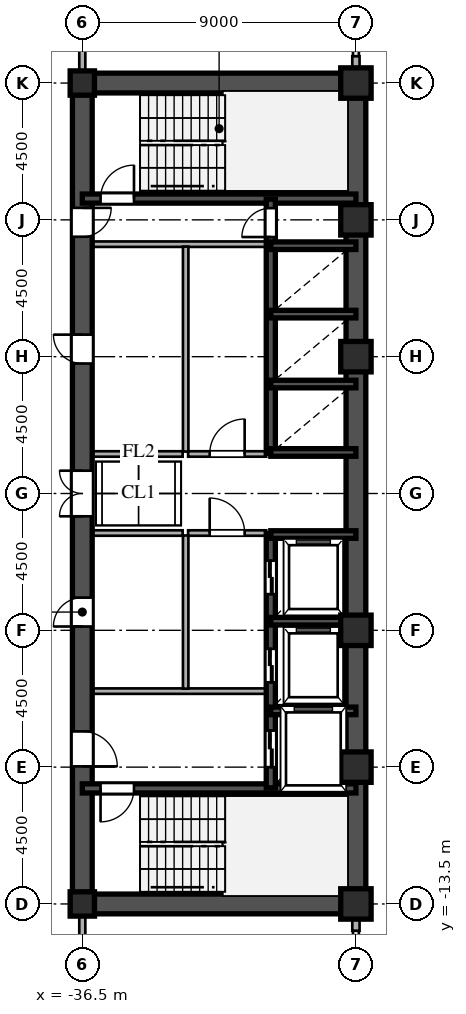
"""IFC4 building model, lengths in metres.
Left out: names, types, materials, properties, quantities, classifications, styles, units other than length and angle.
Written with IfcOpenShell. Run it as: python <this file> out.ifc"""

import sys

from ifc_helpers import new_model, si_unit, direction, frame, frame_2d, origin, origin_2d, place, context, subcontext, project, spatial, rectangle, hollow_rectangle, i_section, extrude, source, transform, mapped, element, fill, save


model = new_model("IFC4")
c1 = context("Model", 3, precision=1e-05, world=origin(), true_north=direction((0.0, 1.0)))
c2 = subcontext(c1, "Body", "Model", "MODEL_VIEW")
j1 = project(units=[si_unit("LENGTHUNIT", "METRE"), si_unit("PLANEANGLEUNIT", "RADIAN")], contexts=[c1])
p1 = place(None, origin())
s1 = spatial("IfcSite", under=j1, at=p1, CompositionType="ELEMENT")
p2 = place(p1, origin())
s2 = spatial("IfcBuilding", under=s1, at=p2, CompositionType="ELEMENT")
p3 = place(p2, frame((0.0, 0.0, 83.7)))
s3 = spatial("IfcBuildingStorey", under=s2, at=p3, CompositionType="ELEMENT", Elevation=83.7)
m1 = source(origin(), c2, "Body", "SweptSolid", [
    extrude(hollow_rectangle(XDim=1.0, YDim=1.0, WallThickness=0.042, at=origin_2d()), origin(), (0.0, 0.0, 1.0), 3.6),
])
for number, where, z_axis, x_axis in (
    (1, (-27.5, -13.5, 0.0), (0.0, 0.0, 1.0), (1.0, 0.0, 0.0)),
    (2, (-27.5, -9.0, 0.0), (0.0, 0.0, 1.0), (1.0, 0.0, 0.0)),
    (3, (-27.5, -4.5, 0.0), (0.0, 0.0, 1.0), (1.0, 0.0, 0.0)),
    (4, (-27.5, 4.5, 0.0), (0.0, 0.0, 1.0), (1.0, 0.0, 0.0)),
    (5, (-27.5, 9.0, 0.0), (0.0, 0.0, 1.0), (1.0, 0.0, 0.0)),
    (6, (-27.5, 13.5, 0.0), (0.0, 0.0, 1.0), (1.0, 0.0, 0.0)),
):
    element("IfcColumn", number, at=place(p3, frame(where, z_axis=z_axis, x_axis=x_axis)), inside=s3, PredefinedType="COLUMN", context=c2, shape_type="MappedRepresentation", body=[
        mapped(m1, transform((0.0, 0.0, 0.0), scale=1.0)),
    ])
m2 = source(origin(), c2, "Body", "SweptSolid", [
    extrude(i_section(OverallWidth=0.8, OverallDepth=0.8, WebThickness=0.032, FlangeThickness=0.05, at=origin_2d()), origin(), (0.0, 0.0, 1.0), 3.6),
])
for number, where, z_axis, x_axis in (
    (7, (-36.5, -13.5, 0.0), (0.0, 0.0, 1.0), (1.0, 0.0, 0.0)),
    (8, (-36.5, 13.5, 0.0), (0.0, 0.0, 1.0), (1.0, 0.0, 0.0)),
):
    element("IfcColumn", number, at=place(p3, frame(where, z_axis=z_axis, x_axis=x_axis)), inside=s3, PredefinedType="COLUMN", context=c2, shape_type="MappedRepresentation", body=[
        mapped(m2, transform((0.0, 0.0, 0.0), scale=1.0)),
    ])
for number, where, z_axis, x_axis in (
    (9, (-27.5, -14.38, 0.0), (0.0, 0.0, 1.0), (0.0, 1.0, 0.0)),
    (10, (-27.5, 13.83, 0.0), (0.0, 0.0, 1.0), (0.0, 1.0, 0.0)),
):
    element("IfcWall", number, at=place(p3, frame(where, z_axis=z_axis, x_axis=x_axis)), inside=s3, PredefinedType="SOLIDWALL", context=c2, shape_type="SweptSolid", body=[
        extrude(rectangle(XDim=0.55, YDim=0.24, at=frame_2d((0.275, 0.0))), origin(), (0.0, 0.0, 1.0), 2.84),
    ])
for number, where, z_axis, x_axis in (
    (11, (-27.5, -13.5, 0.0), (0.0, 0.0, 1.0), (0.0, 1.0, 0.0)),
    (12, (-27.5, 1.3, 0.0), (0.0, 0.0, 1.0), (0.0, 1.0, 0.0)),
):
    element("IfcWall", number, at=place(p3, frame(where, z_axis=z_axis, x_axis=x_axis)), inside=s3, PredefinedType="SHEAR", context=c2, shape_type="SweptSolid", body=[
        extrude(rectangle(XDim=12.2, YDim=0.65, at=frame_2d((6.1, 0.0))), origin(), (0.0, 0.0, 1.0), 3.34),
    ])
p4 = place(p3, frame((-27.5, -1.3, 0.0), z_axis=(0.0, 0.0, 1.0), x_axis=(0.0, 1.0, 0.0)))
e13 = element("IfcWall", 13, at=p4, inside=s3, PredefinedType="SHEAR", context=c2, shape_type="SweptSolid", body=[
    extrude(rectangle(XDim=2.6, YDim=0.65, at=frame_2d((1.3, 0.0))), origin(), (0.0, 0.0, 1.0), 3.34),
])
for number, where, z_axis, x_axis in (
    (14, (-36.5, -13.5, 0.0), (0.0, 0.0, 1.0), (1.0, 0.0, 0.0)),
    (15, (-36.5, 13.5, 0.0), (0.0, 0.0, 1.0), (1.0, 0.0, 0.0)),
):
    element("IfcWall", number, at=place(p3, frame(where, z_axis=z_axis, x_axis=x_axis)), inside=s3, PredefinedType="SHEAR", context=c2, shape_type="SweptSolid", body=[
        extrude(rectangle(XDim=9.0, YDim=0.65, at=frame_2d((4.5, 0.0))), origin(), (0.0, 0.0, 1.0), 3.34),
    ])
p5 = place(p3, frame((-36.5, -13.65, 0.0), z_axis=(0.0, 0.0, 1.0), x_axis=(0.0, 1.0, 0.0)))
e16 = element("IfcWall", 16, at=p5, inside=s3, PredefinedType="SHEAR", context=c2, shape_type="SweptSolid", body=[
    extrude(rectangle(XDim=7.15, YDim=0.65, at=frame_2d((3.575, 0.0))), origin(), (0.0, 0.0, 1.0), 3.34),
])
p6 = place(p5, frame((4.675, 0.0, 0.0)))
e17 = element("IfcOpeningElement", 17, at=p6, cuts=e16, PredefinedType="OPENING", context=c2, shape_type="SweptSolid", body=[
    extrude(rectangle(XDim=1.15, YDim=2.2, at=frame_2d((0.575, 1.1))), frame((0.0, 0.335, 0.0), z_axis=(0.0, -1.0, 0.0), x_axis=(1.0, 0.0, 0.0)), (0.0, 0.0, 1.0), 0.67),
])
p7 = place(p3, frame((-36.5, -1.3, 0.0), z_axis=(0.0, 0.0, 1.0), x_axis=(0.0, 1.0, 0.0)))
e18 = element("IfcWall", 18, at=p7, inside=s3, PredefinedType="SHEAR", context=c2, shape_type="SweptSolid", body=[
    extrude(rectangle(XDim=2.6, YDim=0.65, at=frame_2d((1.3, 0.0))), origin(), (0.0, 0.0, 1.0), 3.34),
])
p8 = place(p7, frame((0.55, 0.0, 0.0)))
e19 = element("IfcOpeningElement", 19, at=p8, cuts=e18, PredefinedType="OPENING", context=c2, shape_type="SweptSolid", body=[
    extrude(rectangle(XDim=1.5, YDim=2.3, at=frame_2d((0.75, 1.15))), frame((0.0, 0.335, 0.0), z_axis=(0.0, -1.0, 0.0), x_axis=(1.0, 0.0, 0.0)), (0.0, 0.0, 1.0), 0.67),
])
p9 = place(p3, frame((-36.5, 8.2, 0.0), z_axis=(0.0, 0.0, 1.0), x_axis=(0.0, 1.0, 0.0)))
e20 = element("IfcWall", 20, at=p9, inside=s3, PredefinedType="SHEAR", context=c2, shape_type="SweptSolid", body=[
    extrude(rectangle(XDim=5.45, YDim=0.65, at=frame_2d((2.725, 0.0))), origin(), (0.0, 0.0, 1.0), 3.34),
])
p10 = place(p9, frame((0.245, 0.0, 0.0)))
e21 = element("IfcOpeningElement", 21, at=p10, cuts=e20, PredefinedType="OPENING", context=c2, shape_type="SweptSolid", body=[
    extrude(rectangle(XDim=0.95, YDim=2.15, at=frame_2d((0.475, 1.075))), frame((0.0, 0.335, 0.0), z_axis=(0.0, -1.0, 0.0), x_axis=(1.0, 0.0, 0.0)), (0.0, 0.0, 1.0), 0.67),
])
p11 = place(p3, frame((-36.5, -6.5, 0.0), z_axis=(0.0, 0.0, 1.0), x_axis=(0.0, 1.0, 0.0)))
e22 = element("IfcWall", 22, at=p11, inside=s3, PredefinedType="SHEAR", context=c2, shape_type="SweptSolid", body=[
    extrude(rectangle(XDim=5.2, YDim=0.65, at=frame_2d((2.6, 0.0))), origin(), (0.0, 0.0, 1.0), 3.34),
])
p12 = place(p11, frame((2.125, 0.0, 0.0)))
e23 = element("IfcOpeningElement", 23, at=p12, cuts=e22, PredefinedType="OPENING", context=c2, shape_type="SweptSolid", body=[
    extrude(rectangle(XDim=0.95, YDim=2.15, at=frame_2d((0.475, 1.075))), frame((0.0, 0.335, 0.0), z_axis=(0.0, -1.0, 0.0), x_axis=(1.0, 0.0, 0.0)), (0.0, 0.0, 1.0), 0.67),
])
p13 = place(p3, frame((-36.5, 1.3, 0.0), z_axis=(0.0, 0.0, 1.0), x_axis=(0.0, 1.0, 0.0)))
e24 = element("IfcWall", 24, at=p13, inside=s3, PredefinedType="SHEAR", context=c2, shape_type="SweptSolid", body=[
    extrude(rectangle(XDim=6.9, YDim=0.65, at=frame_2d((3.45, 0.0))), origin(), (0.0, 0.0, 1.0), 3.34),
])
p14 = place(p13, frame((2.975, 0.0, 0.0)))
e25 = element("IfcOpeningElement", 25, at=p14, cuts=e24, PredefinedType="OPENING", context=c2, shape_type="SweptSolid", body=[
    extrude(rectangle(XDim=0.95, YDim=2.15, at=frame_2d((0.475, 1.075))), frame((0.0, 0.335, 0.0), z_axis=(0.0, -1.0, 0.0), x_axis=(1.0, 0.0, 0.0)), (0.0, 0.0, 1.0), 0.67),
])
p15 = place(p3, frame((-36.5, -9.7, 0.0), z_axis=(0.0, 0.0, 1.0), x_axis=(1.0, 0.0, 0.0)))
e26 = element("IfcWall", 26, at=p15, inside=s3, PredefinedType="SHEAR", context=c2, shape_type="SweptSolid", body=[
    extrude(rectangle(XDim=9.0, YDim=0.3, at=frame_2d((4.5, 0.0))), origin(), (0.0, 0.0, 1.0), 3.34),
])
p16 = place(p15, frame((0.6, 0.0, 0.0)))
e27 = element("IfcOpeningElement", 27, at=p16, cuts=e26, PredefinedType="OPENING", context=c2, shape_type="SweptSolid", body=[
    extrude(rectangle(XDim=1.1, YDim=2.2, at=frame_2d((0.55, 1.1))), frame((0.0, 0.16, 0.0), z_axis=(0.0, -1.0, 0.0), x_axis=(1.0, 0.0, 0.0)), (0.0, 0.0, 1.0), 0.32),
])
p17 = place(p3, frame((-36.5, 9.7, 0.0), z_axis=(0.0, 0.0, 1.0), x_axis=(1.0, 0.0, 0.0)))
e28 = element("IfcWall", 28, at=p17, inside=s3, PredefinedType="SHEAR", context=c2, shape_type="SweptSolid", body=[
    extrude(rectangle(XDim=9.0, YDim=0.3, at=frame_2d((4.5, 0.0))), origin(), (0.0, 0.0, 1.0), 3.34),
])
p18 = place(p17, frame((0.6, 0.0, 0.0)))
e29 = element("IfcOpeningElement", 29, at=p18, cuts=e28, PredefinedType="OPENING", context=c2, shape_type="SweptSolid", body=[
    extrude(rectangle(XDim=1.1, YDim=2.2, at=frame_2d((0.55, 1.1))), frame((0.0, 0.16, 0.0), z_axis=(0.0, -1.0, 0.0), x_axis=(1.0, 0.0, 0.0)), (0.0, 0.0, 1.0), 0.32),
])
for number, where, z_axis, x_axis in (
    (30, (-30.3, -7.15, 0.0), (0.0, 0.0, 1.0), (1.0, 0.0, 0.0)),
    (31, (-30.3, -4.2, 0.0), (0.0, 0.0, 1.0), (1.0, 0.0, 0.0)),
    (32, (-30.3, -1.35, 0.0), (0.0, 0.0, 1.0), (1.0, 0.0, 0.0)),
    (33, (-30.3, 1.35, 0.0), (0.0, 0.0, 1.0), (1.0, 0.0, 0.0)),
    (34, (-30.3, 3.6, 0.0), (0.0, 0.0, 1.0), (1.0, 0.0, 0.0)),
    (35, (-30.3, 5.9, 0.0), (0.0, 0.0, 1.0), (1.0, 0.0, 0.0)),
    (36, (-30.3, 8.15, 0.0), (0.0, 0.0, 1.0), (1.0, 0.0, 0.0)),
):
    element("IfcWall", number, at=place(p3, frame(where, z_axis=z_axis, x_axis=x_axis)), inside=s3, PredefinedType="SHEAR", context=c2, shape_type="SweptSolid", body=[
        extrude(rectangle(XDim=2.8, YDim=0.25, at=frame_2d((1.4, 0.0))), origin(), (0.0, 0.0, 1.0), 3.34),
    ])
p19 = place(p3, frame((-30.3, -9.68, 0.0), z_axis=(0.0, 0.0, 1.0), x_axis=(0.0, 1.0, 0.0)))
e37 = element("IfcWall", 37, at=p19, inside=s3, PredefinedType="SHEAR", context=c2, shape_type="SweptSolid", body=[
    extrude(rectangle(XDim=2.56, YDim=0.3, at=frame_2d((1.28, 0.0))), origin(), (0.0, 0.0, 1.0), 3.34),
])
p20 = place(p19, frame((0.68, 0.0, 0.0)))
e38 = element("IfcOpeningElement", 38, at=p20, cuts=e37, PredefinedType="OPENING", context=c2, shape_type="SweptSolid", body=[
    extrude(rectangle(XDim=1.2, YDim=2.25, at=frame_2d((0.6, 1.125))), frame((0.0, 0.16, 0.0), z_axis=(0.0, -1.0, 0.0), x_axis=(1.0, 0.0, 0.0)), (0.0, 0.0, 1.0), 0.32),
])
p21 = place(p3, frame((-30.3, -7.12, 0.0), z_axis=(0.0, 0.0, 1.0), x_axis=(0.0, 1.0, 0.0)))
e39 = element("IfcWall", 39, at=p21, inside=s3, PredefinedType="SHEAR", context=c2, shape_type="SweptSolid", body=[
    extrude(rectangle(XDim=2.92, YDim=0.3, at=frame_2d((1.46, 0.0))), origin(), (0.0, 0.0, 1.0), 3.34),
])
p22 = place(p21, frame((0.91, 0.0, 0.0)))
e40 = element("IfcOpeningElement", 40, at=p22, cuts=e39, PredefinedType="OPENING", context=c2, shape_type="SweptSolid", body=[
    extrude(rectangle(XDim=1.1, YDim=2.2, at=frame_2d((0.55, 1.1))), frame((0.0, 0.16, 0.0), z_axis=(0.0, -1.0, 0.0), x_axis=(1.0, 0.0, 0.0)), (0.0, 0.0, 1.0), 0.32),
])
p23 = place(p3, frame((-30.3, -4.2, 0.0), z_axis=(0.0, 0.0, 1.0), x_axis=(0.0, 1.0, 0.0)))
e41 = element("IfcWall", 41, at=p23, inside=s3, PredefinedType="SHEAR", context=c2, shape_type="SweptSolid", body=[
    extrude(rectangle(XDim=2.88, YDim=0.3, at=frame_2d((1.44, 0.0))), origin(), (0.0, 0.0, 1.0), 3.34),
])
p24 = place(p23, frame((0.89, 0.0, 0.0)))
e42 = element("IfcOpeningElement", 42, at=p24, cuts=e41, PredefinedType="OPENING", context=c2, shape_type="SweptSolid", body=[
    extrude(rectangle(XDim=1.1, YDim=2.2, at=frame_2d((0.55, 1.1))), frame((0.0, 0.16, 0.0), z_axis=(0.0, -1.0, 0.0), x_axis=(1.0, 0.0, 0.0)), (0.0, 0.0, 1.0), 0.32),
])
p25 = place(p3, frame((-30.3, 1.32, 0.0), z_axis=(0.0, 0.0, 1.0), x_axis=(0.0, 1.0, 0.0)))
e43 = element("IfcWall", 43, at=p25, inside=s3, PredefinedType="SHEAR", context=c2, shape_type="SweptSolid", body=[
    extrude(rectangle(XDim=2.28, YDim=0.3, at=frame_2d((1.14, 0.0))), origin(), (0.0, 0.0, 1.0), 3.34),
])
p26 = place(p3, frame((-30.3, 3.6, 0.0), z_axis=(0.0, 0.0, 1.0), x_axis=(0.0, 1.0, 0.0)))
e44 = element("IfcWall", 44, at=p26, inside=s3, PredefinedType="SHEAR", context=c2, shape_type="SweptSolid", body=[
    extrude(rectangle(XDim=2.3, YDim=0.3, at=frame_2d((1.15, 0.0))), origin(), (0.0, 0.0, 1.0), 3.34),
])
p27 = place(p3, frame((-30.3, 5.9, 0.0), z_axis=(0.0, 0.0, 1.0), x_axis=(0.0, 1.0, 0.0)))
e45 = element("IfcWall", 45, at=p27, inside=s3, PredefinedType="SHEAR", context=c2, shape_type="SweptSolid", body=[
    extrude(rectangle(XDim=2.25, YDim=0.3, at=frame_2d((1.125, 0.0))), origin(), (0.0, 0.0, 1.0), 3.34),
])
p28 = place(p3, frame((-30.3, 8.15, 0.0), z_axis=(0.0, 0.0, 1.0), x_axis=(0.0, 1.0, 0.0)))
e46 = element("IfcWall", 46, at=p28, inside=s3, PredefinedType="SHEAR", context=c2, shape_type="SweptSolid", body=[
    extrude(rectangle(XDim=1.53, YDim=0.3, at=frame_2d((0.765, 0.0))), origin(), (0.0, 0.0, 1.0), 3.34),
])
p29 = place(p28, frame((0.285, 0.0, 0.0)))
e47 = element("IfcOpeningElement", 47, at=p29, cuts=e46, PredefinedType="OPENING", context=c2, shape_type="SweptSolid", body=[
    extrude(rectangle(XDim=0.95, YDim=2.15, at=frame_2d((0.475, 1.075))), frame((0.0, 0.16, 0.0), z_axis=(0.0, -1.0, 0.0), x_axis=(1.0, 0.0, 0.0)), (0.0, 0.0, 1.0), 0.32),
])
for number, where, z_axis, x_axis in (
    (48, (-36.15, -6.5, 0.0), (0.0, 0.0, 1.0), (1.0, 0.0, 0.0)),
    (49, (-36.15, 8.2, 0.0), (0.0, 0.0, 1.0), (1.0, 0.0, 0.0)),
):
    element("IfcWall", number, at=place(p3, frame(where, z_axis=z_axis, x_axis=x_axis)), inside=s3, PredefinedType="PARTITIONING", context=c2, shape_type="SweptSolid", body=[
        extrude(rectangle(XDim=5.7, YDim=0.18, at=frame_2d((2.85, 0.0))), origin(), (0.0, 0.0, 1.0), 3.34),
    ])
p30 = place(p3, frame((-33.1, -6.42, 0.0), z_axis=(0.0, 0.0, 1.0), x_axis=(0.0, 1.0, 0.0)))
e50 = element("IfcWall", 50, at=p30, inside=s3, PredefinedType="PARTITIONING", context=c2, shape_type="SweptSolid", body=[
    extrude(rectangle(XDim=5.04, YDim=0.18, at=frame_2d((2.52, 0.0))), origin(), (0.0, 0.0, 1.0), 3.34),
])
p31 = place(p3, frame((-33.1, 1.38, 0.0), z_axis=(0.0, 0.0, 1.0), x_axis=(0.0, 1.0, 0.0)))
e51 = element("IfcWall", 51, at=p31, inside=s3, PredefinedType="PARTITIONING", context=c2, shape_type="SweptSolid", body=[
    extrude(rectangle(XDim=6.74, YDim=0.18, at=frame_2d((3.37, 0.0))), origin(), (0.0, 0.0, 1.0), 3.34),
])
p32 = place(p3, frame((-33.02, -1.3, 0.0), z_axis=(0.0, 0.0, 1.0), x_axis=(1.0, 0.0, 0.0)))
e52 = element("IfcWall", 52, at=p32, inside=s3, PredefinedType="PARTITIONING", context=c2, shape_type="SweptSolid", body=[
    extrude(rectangle(XDim=2.57, YDim=0.18, at=frame_2d((1.285, 0.0))), origin(), (0.0, 0.0, 1.0), 3.34),
])
p33 = place(p32, frame((0.71, 0.0, 0.0)))
e53 = element("IfcOpeningElement", 53, at=p33, cuts=e52, PredefinedType="OPENING", context=c2, shape_type="SweptSolid", body=[
    extrude(rectangle(XDim=1.15, YDim=2.2, at=frame_2d((0.575, 1.1))), frame((0.0, 0.1, 0.0), z_axis=(0.0, -1.0, 0.0), x_axis=(1.0, 0.0, 0.0)), (0.0, 0.0, 1.0), 0.2),
])
p34 = place(p3, frame((-33.02, 1.3, 0.0), z_axis=(0.0, 0.0, 1.0), x_axis=(1.0, 0.0, 0.0)))
e54 = element("IfcWall", 54, at=p34, inside=s3, PredefinedType="PARTITIONING", context=c2, shape_type="SweptSolid", body=[
    extrude(rectangle(XDim=2.57, YDim=0.18, at=frame_2d((1.285, 0.0))), origin(), (0.0, 0.0, 1.0), 3.34),
])
p35 = place(p34, frame((0.71, 0.0, 0.0)))
e55 = element("IfcOpeningElement", 55, at=p35, cuts=e54, PredefinedType="OPENING", context=c2, shape_type="SweptSolid", body=[
    extrude(rectangle(XDim=1.15, YDim=2.2, at=frame_2d((0.575, 1.1))), frame((0.0, 0.1, 0.0), z_axis=(0.0, -1.0, 0.0), x_axis=(1.0, 0.0, 0.0)), (0.0, 0.0, 1.0), 0.2),
])
for number, where, z_axis, x_axis in (
    (56, (-36.15, -1.3, 0.0), (0.0, 0.0, 1.0), (1.0, 0.0, 0.0)),
    (57, (-36.15, 1.3, 0.0), (0.0, 0.0, 1.0), (1.0, 0.0, 0.0)),
):
    element("IfcWall", number, at=place(p3, frame(where, z_axis=z_axis, x_axis=x_axis)), inside=s3, PredefinedType="PARTITIONING", context=c2, shape_type="SweptSolid", body=[
        extrude(rectangle(XDim=2.95, YDim=0.18, at=frame_2d((1.475, 0.0))), origin(), (0.0, 0.0, 1.0), 3.34),
    ])
for number, where, z_axis, x_axis in (
    (58, (-36.5, -15.515, 0.0), (0.0, 0.0, 1.0), (0.0, 1.0, 0.0)),
    (59, (-36.5, 13.83, 0.0), (0.0, 0.0, 1.0), (0.0, 1.0, 0.0)),
):
    element("IfcWall", number, at=place(p3, frame(where, z_axis=z_axis, x_axis=x_axis)), inside=s3, PredefinedType="PARTITIONING", context=c2, shape_type="SweptSolid", body=[
        extrude(rectangle(XDim=1.685, YDim=0.2, at=frame_2d((0.842, 0.0))), origin(), (0.0, 0.0, 1.0), 2.44),
    ])
m3 = source(origin(), c2, "Body", "SweptSolid", [
    extrude(rectangle(XDim=1.15, YDim=2.2, at=frame_2d((0.575, 1.1))), frame((0.0, 0.025, 0.0), z_axis=(0.0, -1.0, 0.0), x_axis=(1.0, 0.0, 0.0)), (0.0, 0.0, 1.0), 0.05),
])
p36 = place(p6, frame((1.15, 0.0, 0.0), z_axis=(0.0, 0.0, 1.0), x_axis=(-1.0, 0.0, 0.0)))
e60 = element("IfcDoor", 60, at=p36, inside=s3, OperationType="SINGLE_SWING_LEFT", PredefinedType="DOOR", context=c2, shape_type="MappedRepresentation", body=[
    mapped(m3, transform((0.0, 0.0, 0.0), scale=1.0)),
])
fill(e17, e60)
m4 = source(origin(), c2, "Body", "SweptSolid", [
    extrude(rectangle(XDim=1.5, YDim=2.3, at=frame_2d((0.75, 1.15))), frame((0.0, 0.025, 0.0), z_axis=(0.0, -1.0, 0.0), x_axis=(1.0, 0.0, 0.0)), (0.0, 0.0, 1.0), 0.05),
])
p37 = place(p8, origin())
e61 = element("IfcDoor", 61, at=p37, inside=s3, OperationType="DOUBLE_SWING_LEFT", PredefinedType="DOOR", context=c2, shape_type="MappedRepresentation", body=[
    mapped(m4, transform((0.0, 0.0, 0.0), scale=1.0)),
])
fill(e19, e61)
m5 = source(origin(), c2, "Body", "SweptSolid", [
    extrude(rectangle(XDim=0.95, YDim=2.15, at=frame_2d((0.475, 1.075))), frame((0.0, 0.025, 0.0), z_axis=(0.0, -1.0, 0.0), x_axis=(1.0, 0.0, 0.0)), (0.0, 0.0, 1.0), 0.05),
])
p38 = place(p10, frame((0.95, 0.0, 0.0), z_axis=(0.0, 0.0, 1.0), x_axis=(-1.0, 0.0, 0.0)))
e62 = element("IfcDoor", 62, at=p38, inside=s3, OperationType="SINGLE_SWING_RIGHT", PredefinedType="DOOR", context=c2, shape_type="MappedRepresentation", body=[
    mapped(m5, transform((0.0, 0.0, 0.0), scale=1.0)),
])
fill(e21, e62)
p39 = place(p12, origin())
e63 = element("IfcDoor", 63, at=p39, inside=s3, OperationType="SINGLE_SWING_LEFT", PredefinedType="DOOR", context=c2, shape_type="MappedRepresentation", body=[
    mapped(m5, transform((0.0, 0.0, 0.0), scale=1.0)),
])
fill(e23, e63)
p40 = place(p14, origin())
e64 = element("IfcDoor", 64, at=p40, inside=s3, OperationType="SINGLE_SWING_RIGHT", PredefinedType="DOOR", context=c2, shape_type="MappedRepresentation", body=[
    mapped(m5, transform((0.0, 0.0, 0.0), scale=1.0)),
])
fill(e25, e64)
m6 = source(origin(), c2, "Body", "SweptSolid", [
    extrude(rectangle(XDim=1.1, YDim=2.2, at=frame_2d((0.55, 1.1))), frame((0.0, 0.025, 0.0), z_axis=(0.0, -1.0, 0.0), x_axis=(1.0, 0.0, 0.0)), (0.0, 0.0, 1.0), 0.05),
])
p41 = place(p16, frame((1.1, 0.0, 0.0), z_axis=(0.0, 0.0, 1.0), x_axis=(-1.0, 0.0, 0.0)))
e65 = element("IfcDoor", 65, at=p41, inside=s3, OperationType="SINGLE_SWING_LEFT", PredefinedType="DOOR", context=c2, shape_type="MappedRepresentation", body=[
    mapped(m6, transform((0.0, 0.0, 0.0), scale=1.0)),
])
fill(e27, e65)
p42 = place(p18, origin())
e66 = element("IfcDoor", 66, at=p42, inside=s3, OperationType="SINGLE_SWING_RIGHT", PredefinedType="DOOR", context=c2, shape_type="MappedRepresentation", body=[
    mapped(m6, transform((0.0, 0.0, 0.0), scale=1.0)),
])
fill(e29, e66)
m7 = source(origin(), c2, "Body", "SweptSolid", [
    extrude(rectangle(XDim=1.2, YDim=2.25, at=frame_2d((0.6, 1.125))), frame((0.0, 0.025, 0.0), z_axis=(0.0, -1.0, 0.0), x_axis=(1.0, 0.0, 0.0)), (0.0, 0.0, 1.0), 0.05),
])
p43 = place(p20, origin())
e67 = element("IfcDoor", 67, at=p43, inside=s3, OperationType="DOUBLE_DOOR_SLIDING", PredefinedType="DOOR", context=c2, shape_type="MappedRepresentation", body=[
    mapped(m7, transform((0.0, 0.0, 0.0), scale=1.0)),
])
fill(e38, e67)
m8 = source(origin(), c2, "Body", "SweptSolid", [
    extrude(rectangle(XDim=1.1, YDim=2.2, at=frame_2d((0.55, 1.1))), frame((0.0, 0.025, 0.0), z_axis=(0.0, -1.0, 0.0), x_axis=(1.0, 0.0, 0.0)), (0.0, 0.0, 1.0), 0.05),
])
p44 = place(p22, origin())
e68 = element("IfcDoor", 68, at=p44, inside=s3, OperationType="DOUBLE_DOOR_SLIDING", PredefinedType="DOOR", context=c2, shape_type="MappedRepresentation", body=[
    mapped(m8, transform((0.0, 0.0, 0.0), scale=1.0)),
])
fill(e40, e68)
p45 = place(p24, origin())
e69 = element("IfcDoor", 69, at=p45, inside=s3, OperationType="DOUBLE_DOOR_SLIDING", PredefinedType="DOOR", context=c2, shape_type="MappedRepresentation", body=[
    mapped(m8, transform((0.0, 0.0, 0.0), scale=1.0)),
])
fill(e42, e69)
p46 = place(p29, origin())
e70 = element("IfcDoor", 70, at=p46, inside=s3, OperationType="SINGLE_SWING_LEFT", PredefinedType="DOOR", context=c2, shape_type="MappedRepresentation", body=[
    mapped(m5, transform((0.0, 0.0, 0.0), scale=1.0)),
])
fill(e47, e70)
p47 = place(p33, origin())
e71 = element("IfcDoor", 71, at=p47, inside=s3, OperationType="SINGLE_SWING_LEFT", PredefinedType="DOOR", context=c2, shape_type="MappedRepresentation", body=[
    mapped(m3, transform((0.0, 0.0, 0.0), scale=1.0)),
])
fill(e53, e71)
p48 = place(p35, origin())
e72 = element("IfcDoor", 72, at=p48, inside=s3, OperationType="SINGLE_SWING_RIGHT", PredefinedType="DOOR", context=c2, shape_type="MappedRepresentation", body=[
    mapped(m3, transform((0.0, 0.0, 0.0), scale=1.0)),
])
fill(e55, e72)
save(model, sys.argv[1])
